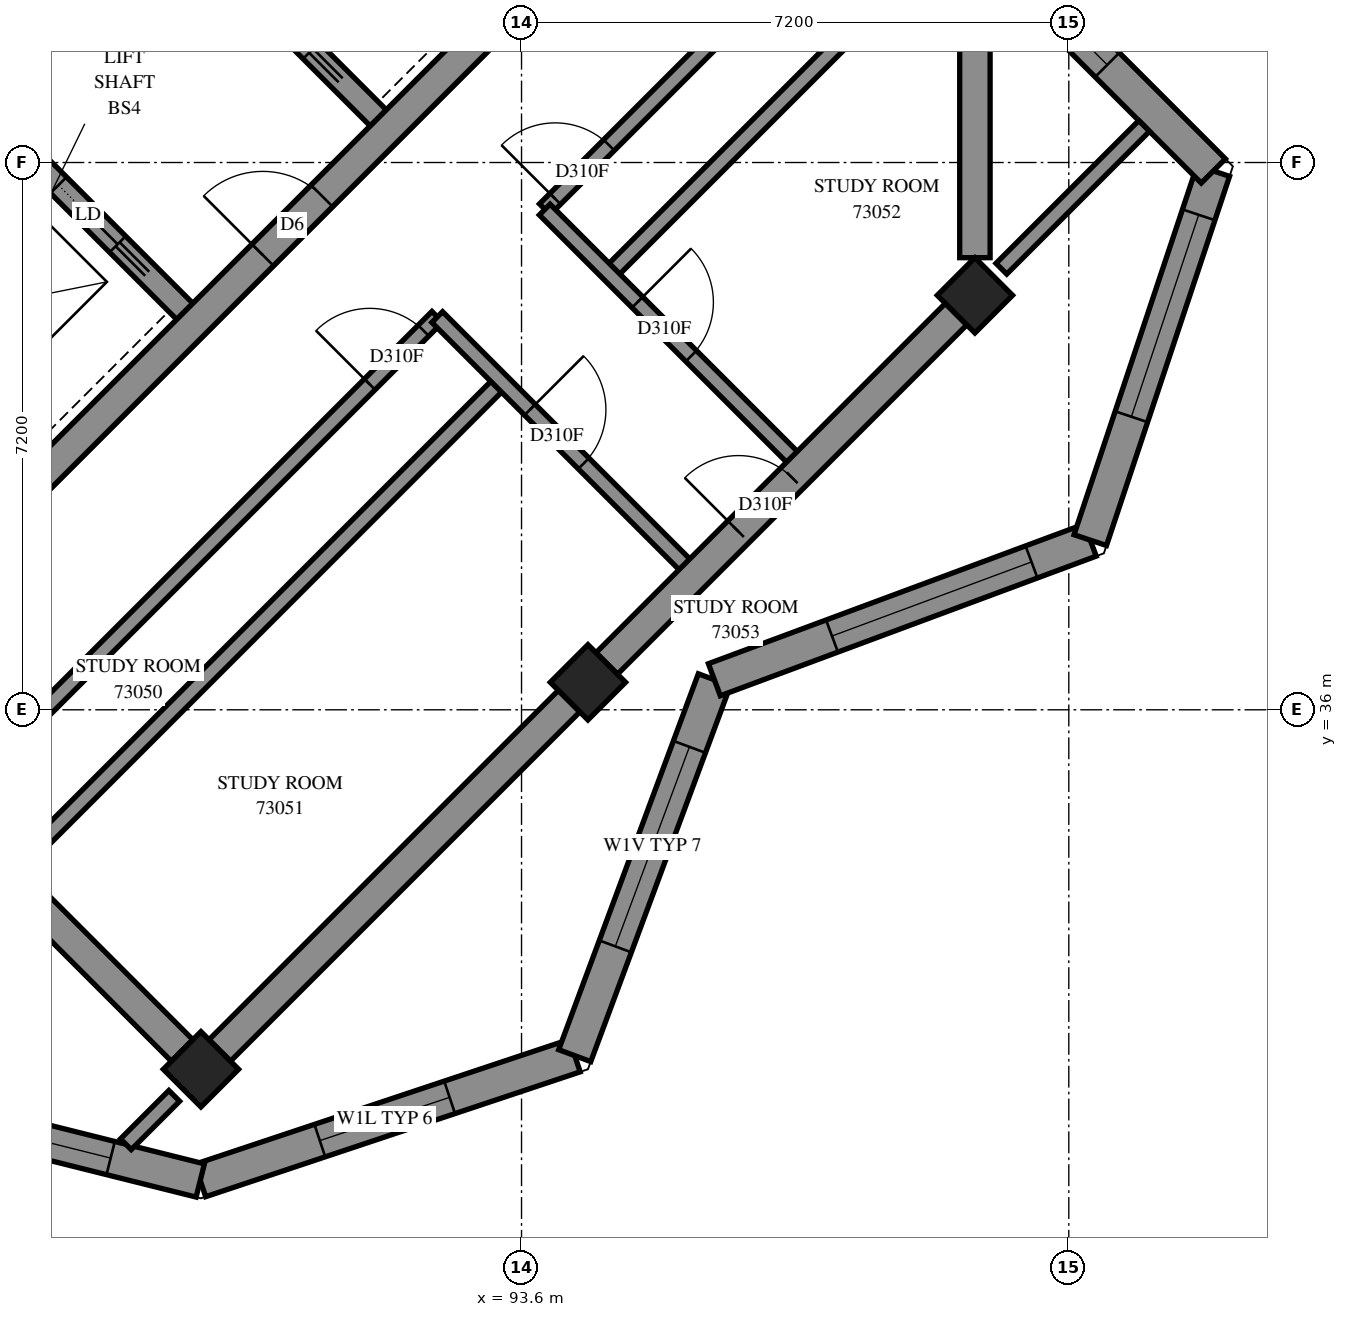
"""IFC4 building model, lengths in metres.
Left out: names, types, materials, properties, quantities, classifications, styles, units other than length and angle.
Written with IfcOpenShell. Run it as: python <this file> out.ifc"""

import sys

from ifc_helpers import new_model, si_unit, direction, frame, frame_2d, origin, origin_2d, place, context, subcontext, project, spatial, polyline, rectangle, outline, extrude, element, fill, save


model = new_model("IFC4")
c1 = context("Model", 3, precision=1e-05, world=origin(), true_north=direction((0.0, 1.0)))
c2 = subcontext(c1, "Body", "Model", "MODEL_VIEW")
j1 = project(units=[si_unit("LENGTHUNIT", "METRE"), si_unit("PLANEANGLEUNIT", "RADIAN")], contexts=[c1])
p1 = place(None, origin())
s1 = spatial("IfcSite", under=j1, at=p1, CompositionType="ELEMENT")
p2 = place(p1, origin())
s2 = spatial("IfcBuilding", under=s1, at=p2, CompositionType="ELEMENT")
p3 = place(p2, frame((0.0, 0.0, 267.6)))
s3 = spatial("IfcBuildingStorey", under=s2, at=p3, CompositionType="ELEMENT", Elevation=267.6)
for number, where, z_axis, x_axis in (
    (1, (99.565, 41.453, 0.0), (0.0, 0.0, 1.0), (0.707, -0.707, 0.0)),
    (2, (94.474, 36.362, 0.0), (0.0, 0.0, 1.0), (0.707, -0.707, 0.0)),
    (3, (89.382, 31.271, 0.0), (0.0, 0.0, 1.0), (0.707, -0.707, 0.0)),
):
    element("IfcColumn", number, at=place(p3, frame(where, z_axis=z_axis, x_axis=x_axis)), inside=s3, PredefinedType="COLUMN", context=c2, shape_type="SweptSolid", body=[
        extrude(rectangle(XDim=0.7, YDim=0.7, at=origin_2d()), origin(), (0.0, 0.0, 1.0), 3.1),
    ])
p4 = place(p3, frame((86.978, 38.766, -0.3), z_axis=(0.0, 0.0, 1.0), x_axis=(0.7071067812, 0.7071067812, 0.0)))
e4 = element("IfcWall", 4, at=p4, inside=s3, PredefinedType="SHEAR", context=c2, shape_type="SweptSolid", body=[
    extrude(rectangle(XDim=14.4, YDim=0.4, at=frame_2d((7.2, 0.0))), origin(), (0.0, 0.0, 1.0), 2.7),
])
p5 = place(p4, frame((4.55, 0.0, 0.3)))
e5 = element("IfcOpeningElement", 5, at=p5, cuts=e4, PredefinedType="OPENING", context=c2, shape_type="SweptSolid", body=[
    extrude(rectangle(XDim=1.1, YDim=2.1, at=frame_2d((0.55, 1.05))), frame((0.0, 0.21, 0.0), z_axis=(0.0, -1.0, 0.0), x_axis=(1.0, 0.0, 0.0)), (0.0, 0.0, 1.0), 0.42),
])
p6 = place(p4, frame((11.35, 0.0, 0.3)))
e6 = element("IfcOpeningElement", 6, at=p6, cuts=e4, PredefinedType="OPENING", context=c2, shape_type="SweptSolid", body=[
    extrude(rectangle(XDim=1.1, YDim=2.1, at=frame_2d((0.55, 1.05))), frame((0.0, 0.21, 0.0), z_axis=(0.0, -1.0, 0.0), x_axis=(1.0, 0.0, 0.0)), (0.0, 0.0, 1.0), 0.42),
])
p7 = place(p3, frame((78.988, 51.423, 0.0), z_axis=(0.0, 0.0, 1.0), x_axis=(0.7071067812, -0.7071067812, 0.0)))
e7 = element("IfcWall", 7, at=p7, inside=s3, PredefinedType="SOLIDWALL", context=c2, shape_type="SweptSolid", body=[
    extrude(rectangle(XDim=14.4, YDim=0.3, at=frame_2d((7.2, 0.0))), origin(), (0.0, 0.0, 1.0), 3.1),
])
p8 = place(p7, frame((4.95, 0.0, 0.0)))
e8 = element("IfcOpeningElement", 8, at=p8, cuts=e7, PredefinedType="OPENING", context=c2, shape_type="SweptSolid", body=[
    extrude(rectangle(XDim=0.9, YDim=2.1, at=frame_2d((0.45, 1.05))), frame((0.0, 0.16, 0.0), z_axis=(0.0, -1.0, 0.0), x_axis=(1.0, 0.0, 0.0)), (0.0, 0.0, 1.0), 0.32),
])
p9 = place(p7, frame((8.55, 0.0, 0.0)))
e9 = element("IfcOpeningElement", 9, at=p9, cuts=e7, PredefinedType="OPENING", context=c2, shape_type="SweptSolid", body=[
    extrude(rectangle(XDim=0.9, YDim=2.1, at=frame_2d((0.45, 1.05))), frame((0.0, 0.16, 0.0), z_axis=(0.0, -1.0, 0.0), x_axis=(1.0, 0.0, 0.0)), (0.0, 0.0, 1.0), 0.32),
])
p10 = place(p7, frame((12.05, 0.0, 0.0)))
e10 = element("IfcOpeningElement", 10, at=p10, cuts=e7, PredefinedType="OPENING", context=c2, shape_type="SweptSolid", body=[
    extrude(rectangle(XDim=1.1, YDim=2.1, at=frame_2d((0.55, 1.05))), frame((0.0, 0.16, 0.0), z_axis=(0.0, -1.0, 0.0), x_axis=(1.0, 0.0, 0.0)), (0.0, 0.0, 1.0), 0.32),
])
p11 = place(p3, frame((81.534, 53.969, 0.0), z_axis=(0.0, 0.0, 1.0), x_axis=(0.707103309, -0.7071102534, 0.0)))
e11 = element("IfcWall", 11, at=p11, inside=s3, PredefinedType="SOLIDWALL", context=c2, shape_type="SweptSolid", body=[
    extrude(rectangle(XDim=14.4, YDim=0.3, at=frame_2d((7.2, 0.0))), origin(), (0.0, 0.0, 1.0), 3.1),
])
p12 = place(p11, frame((8.55, 0.0, 0.0)))
e12 = element("IfcOpeningElement", 12, at=p12, cuts=e11, PredefinedType="OPENING", context=c2, shape_type="SweptSolid", body=[
    extrude(rectangle(XDim=0.9, YDim=2.1, at=frame_2d((0.45, 1.05))), frame((0.0, 0.16, 0.0), z_axis=(0.0, -1.0, 0.0), x_axis=(1.0, 0.0, 0.0)), (0.0, 0.0, 1.0), 0.32),
])
p13 = place(p11, frame((1.25, 0.0, 0.0)))
e13 = element("IfcOpeningElement", 13, at=p13, cuts=e11, PredefinedType="OPENING", context=c2, shape_type="SweptSolid", body=[
    extrude(rectangle(XDim=1.1, YDim=2.1, at=frame_2d((0.55, 1.05))), frame((0.0, 0.16, 0.0), z_axis=(0.0, -1.0, 0.0), x_axis=(1.0, 0.0, 0.0)), (0.0, 0.0, 1.0), 0.32),
])
p14 = place(p11, frame((4.85, 0.0, 0.0)))
e14 = element("IfcOpeningElement", 14, at=p14, cuts=e11, PredefinedType="OPENING", context=c2, shape_type="SweptSolid", body=[
    extrude(rectangle(XDim=1.1, YDim=2.1, at=frame_2d((0.55, 1.05))), frame((0.0, 0.16, 0.0), z_axis=(0.0, -1.0, 0.0), x_axis=(1.0, 0.0, 0.0)), (0.0, 0.0, 1.0), 0.32),
])
p15 = place(p11, frame((12.05, 0.0, 0.0)))
e15 = element("IfcOpeningElement", 15, at=p15, cuts=e11, PredefinedType="OPENING", context=c2, shape_type="SweptSolid", body=[
    extrude(rectangle(XDim=1.1, YDim=2.1, at=frame_2d((0.55, 1.05))), frame((0.0, 0.16, 0.0), z_axis=(0.0, -1.0, 0.0), x_axis=(1.0, 0.0, 0.0)), (0.0, 0.0, 1.0), 0.32),
])
p16 = place(p3, frame((89.373, 29.808, 0.0), z_axis=(0.0, 0.0, 1.0), x_axis=(0.9486871491, 0.3162162126, 0.0)))
e16 = element("IfcWall", 16, at=p16, inside=s3, PredefinedType="SOLIDWALL", context=c2, shape_type="SweptSolid", body=[
    extrude(outline(polyline([(-0.066, -0.225), (5.301, -0.225), (5.085, 0.225), (0.066, 0.225), (-0.066, -0.225)])), origin(), (0.0, 0.0, 1.0), 3.1),
])
p17 = place(p16, frame((1.658, 0.0, 0.6)))
e17 = element("IfcOpeningElement", 17, at=p17, cuts=e16, PredefinedType="OPENING", context=c2, shape_type="SweptSolid", body=[
    extrude(rectangle(XDim=1.8, YDim=1.9, at=frame_2d((0.9, 0.95))), frame((0.0, 0.235, 0.0), z_axis=(0.0, -1.0, 0.0), x_axis=(1.0, 0.0, 0.0)), (0.0, 0.0, 1.0), 0.47),
])
p18 = place(p3, frame((94.3, 31.45, 0.0), z_axis=(0.0, 0.0, 1.0), x_axis=(0.3481927166, 0.9374229739, 0.0)))
e18 = element("IfcWall", 18, at=p18, inside=s3, PredefinedType="SOLIDWALL", context=c2, shape_type="SweptSolid", body=[
    extrude(outline(polyline([(-0.108, -0.225), (5.172, -0.225), (5.379, 0.225), (0.108, 0.225), (-0.108, -0.225)])), origin(), (0.0, 0.0, 1.0), 3.1),
])
p19 = place(p18, frame((1.534, 0.0, 0.45)))
e19 = element("IfcOpeningElement", 19, at=p19, cuts=e18, PredefinedType="OPENING", context=c2, shape_type="SweptSolid", body=[
    extrude(rectangle(XDim=2.8, YDim=2.55, at=frame_2d((1.4, 1.275))), frame((0.0, 0.235, 0.0), z_axis=(0.0, -1.0, 0.0), x_axis=(1.0, 0.0, 0.0)), (0.0, 0.0, 1.0), 0.47),
])
p20 = place(p3, frame((96.137, 36.395, 0.0), z_axis=(0.0, 0.0, 1.0), x_axis=(0.937429161, 0.3481760591, 0.0)))
e20 = element("IfcWall", 20, at=p20, inside=s3, PredefinedType="SOLIDWALL", context=c2, shape_type="SweptSolid", body=[
    extrude(outline(polyline([(0.103, -0.225), (5.383, -0.225), (5.168, 0.225), (-0.103, 0.225), (0.103, -0.225)])), origin(), (0.0, 0.0, 1.0), 3.1),
])
p21 = place(p20, frame((1.651, 0.0, 0.45)))
e21 = element("IfcOpeningElement", 21, at=p21, cuts=e20, PredefinedType="OPENING", context=c2, shape_type="SweptSolid", body=[
    extrude(rectangle(XDim=2.8, YDim=2.55, at=frame_2d((1.4, 1.275))), frame((0.0, 0.235, 0.0), z_axis=(0.0, -1.0, 0.0), x_axis=(1.0, 0.0, 0.0)), (0.0, 0.0, 1.0), 0.47),
])
p22 = place(p3, frame((101.082, 38.232, 0.0), z_axis=(0.0, 0.0, 1.0), x_axis=(0.316227766, 0.9486832981, 0.0)))
e22 = element("IfcWall", 22, at=p22, inside=s3, PredefinedType="SOLIDWALL", context=c2, shape_type="SweptSolid", body=[
    extrude(outline(polyline([(-0.108, -0.225), (5.259, -0.225), (4.981, 0.225), (0.108, 0.225), (-0.108, -0.225)])), origin(), (0.0, 0.0, 1.0), 3.1),
])
p23 = place(p22, frame((1.711, 0.0, 0.45)))
e23 = element("IfcOpeningElement", 23, at=p23, cuts=e22, PredefinedType="OPENING", context=c2, shape_type="SweptSolid", body=[
    extrude(rectangle(XDim=2.8, YDim=2.55, at=frame_2d((1.4, 1.275))), frame((0.0, 0.235, 0.0), z_axis=(0.0, -1.0, 0.0), x_axis=(1.0, 0.0, 0.0)), (0.0, 0.0, 1.0), 0.47),
])
p24 = place(p3, frame((102.701, 43.089, 0.0), z_axis=(0.0, 0.0, 1.0), x_axis=(-0.7070965479, 0.7071170144, 0.0)))
e24 = element("IfcWall", 24, at=p24, inside=s3, PredefinedType="SOLIDWALL", context=c2, shape_type="SweptSolid", body=[
    extrude(outline(polyline([(-0.139, -0.225), (4.661, -0.225), (5.111, 0.225), (0.139, 0.225), (-0.139, -0.225)])), origin(), (0.0, 0.0, 1.0), 3.1),
])
p25 = place(p24, frame((1.974, 0.0, 0.6)))
e25 = element("IfcOpeningElement", 25, at=p25, cuts=e24, PredefinedType="OPENING", context=c2, shape_type="SweptSolid", body=[
    extrude(rectangle(XDim=1.8, YDim=1.9, at=frame_2d((0.9, 0.95))), frame((0.0, 0.235, 0.0), z_axis=(0.0, -1.0, 0.0), x_axis=(1.0, 0.0, 0.0)), (0.0, 0.0, 1.0), 0.47),
])
p26 = place(p3, frame((85.037, 30.892, 0.0), z_axis=(0.0, 0.0, 1.0), x_axis=(0.970134604, -0.2425672073, 0.0)))
e26 = element("IfcWall", 26, at=p26, inside=s3, PredefinedType="SOLIDWALL", context=c2, shape_type="SweptSolid", body=[
    extrude(outline(polyline([(-0.129, -0.225), (4.536, -0.225), (4.405, 0.225), (0.129, 0.225), (-0.129, -0.225)])), origin(), (0.0, 0.0, 1.0), 2.6),
])
p27 = place(p26, frame((1.455, 0.0, 0.6)))
e27 = element("IfcOpeningElement", 27, at=p27, cuts=e26, PredefinedType="OPENING", context=c2, shape_type="SweptSolid", body=[
    extrude(rectangle(XDim=1.8, YDim=1.9, at=frame_2d((0.9, 0.95))), frame((0.0, 0.235, 0.0), z_axis=(0.0, -1.0, 0.0), x_axis=(1.0, 0.0, 0.0)), (0.0, 0.0, 1.0), 0.47),
])
p28 = place(p3, frame((84.965, 31.946, 0.0), z_axis=(0.0, 0.0, 1.0), x_axis=(0.7070265824, 0.7071869709, 0.0)))
e28 = element("IfcWall", 28, at=p28, inside=s3, PredefinedType="PARTITIONING", context=c2, shape_type="SweptSolid", body=[
    extrude(rectangle(XDim=11.846, YDim=0.2, at=frame_2d((5.923, 0.0))), origin(), (0.0, 0.0, 1.0), 3.1),
])
p29 = place(p3, frame((93.907, 42.585, 0.0), z_axis=(0.0, 0.0, 1.0), x_axis=(0.7071067812, 0.7071067812, 0.0)))
e29 = element("IfcWall", 29, at=p29, inside=s3, PredefinedType="PARTITIONING", context=c2, shape_type="SweptSolid", body=[
    extrude(rectangle(XDim=9.201, YDim=0.2, at=frame_2d((4.601, 0.0))), origin(), (0.0, 0.0, 1.0), 3.1),
])
p30 = place(p29, frame((0.193, 0.0, 0.0)))
e30 = element("IfcOpeningElement", 30, at=p30, cuts=e29, PredefinedType="OPENING", context=c2, shape_type="SweptSolid", body=[
    extrude(rectangle(XDim=1.0, YDim=2.1, at=frame_2d((0.5, 1.05))), frame((0.0, 0.11, 0.0), z_axis=(0.0, -1.0, 0.0), x_axis=(1.0, 0.0, 0.0)), (0.0, 0.0, 1.0), 0.22),
])
p31 = place(p3, frame((86.836, 35.514, 0.0), z_axis=(0.0, 0.0, 1.0), x_axis=(0.7071067812, 0.7071067812, 0.0)))
e31 = element("IfcWall", 31, at=p31, inside=s3, PredefinedType="PARTITIONING", context=c2, shape_type="SweptSolid", body=[
    extrude(rectangle(XDim=7.999, YDim=0.2, at=frame_2d((3.999, 0.0))), origin(), (0.0, 0.0, 1.0), 3.1),
])
p32 = place(p31, frame((6.742, 0.0, 0.0)))
e32 = element("IfcOpeningElement", 32, at=p32, cuts=e31, PredefinedType="OPENING", context=c2, shape_type="SweptSolid", body=[
    extrude(rectangle(XDim=1.0, YDim=2.1, at=frame_2d((0.5, 1.05))), frame((0.0, 0.11, 0.0), z_axis=(0.0, -1.0, 0.0), x_axis=(1.0, 0.0, 0.0)), (0.0, 0.0, 1.0), 0.22),
])
p33 = place(p3, frame((94.755, 41.737, 0.0), z_axis=(0.0, 0.0, 1.0), x_axis=(0.7071146549, 0.7070989073, 0.0)))
e33 = element("IfcWall", 33, at=p33, inside=s3, PredefinedType="PARTITIONING", context=c2, shape_type="SweptSolid", body=[
    extrude(rectangle(XDim=6.35, YDim=0.2, at=frame_2d((3.175, 0.0))), origin(), (0.0, 0.0, 1.0), 3.1),
])
p34 = place(p3, frame((89.731, 31.621, 0.0), z_axis=(0.0, 0.0, 1.0), x_axis=(0.7071067812, 0.7071067812, 0.0)))
e34 = element("IfcWall", 34, at=p34, inside=s3, PredefinedType="PARTITIONING", context=c2, shape_type="SweptSolid", body=[
    extrude(rectangle(XDim=6.211, YDim=0.2, at=frame_2d((3.106, 0.0))), origin(), (0.0, 0.0, 1.0), 2.6),
])
p35 = place(p3, frame((93.905, 42.581, 0.0), z_axis=(0.0, 0.0, 1.0), x_axis=(0.7071067812, -0.7071067812, 0.0)))
e35 = element("IfcWall", 35, at=p35, inside=s3, PredefinedType="PARTITIONING", context=c2, shape_type="SweptSolid", body=[
    extrude(rectangle(XDim=4.8, YDim=0.2, at=frame_2d((2.4, 0.0))), origin(), (0.0, 0.0, 1.0), 3.1),
])
p36 = place(p35, frame((1.725, 0.0, 0.0)))
e36 = element("IfcOpeningElement", 36, at=p36, cuts=e35, PredefinedType="OPENING", context=c2, shape_type="SweptSolid", body=[
    extrude(rectangle(XDim=1.0, YDim=2.1, at=frame_2d((0.5, 1.05))), frame((0.0, 0.11, 0.0), z_axis=(0.0, -1.0, 0.0), x_axis=(1.0, 0.0, 0.0)), (0.0, 0.0, 1.0), 0.22),
])
p37 = place(p3, frame((92.491, 41.167, 0.0), z_axis=(0.0, 0.0, 1.0), x_axis=(0.7071067812, -0.7071067812, 0.0)))
e37 = element("IfcWall", 37, at=p37, inside=s3, PredefinedType="PARTITIONING", context=c2, shape_type="SweptSolid", body=[
    extrude(rectangle(XDim=4.8, YDim=0.2, at=frame_2d((2.4, 0.0))), origin(), (0.0, 0.0, 1.0), 3.1),
])
p38 = place(p37, frame((1.725, 0.0, 0.0)))
e38 = element("IfcOpeningElement", 38, at=p38, cuts=e37, PredefinedType="OPENING", context=c2, shape_type="SweptSolid", body=[
    extrude(rectangle(XDim=1.0, YDim=2.1, at=frame_2d((0.5, 1.05))), frame((0.0, 0.11, 0.0), z_axis=(0.0, -1.0, 0.0), x_axis=(1.0, 0.0, 0.0)), (0.0, 0.0, 1.0), 0.22),
])
p39 = place(p3, frame((97.301, 39.191, 0.0), z_axis=(0.0, 0.0, 1.0), x_axis=(0.7071067812, 0.7071067812, 0.0)))
e39 = element("IfcWall", 39, at=p39, inside=s3, PredefinedType="PARTITIONING", context=c2, shape_type="SweptSolid", body=[
    extrude(rectangle(XDim=2.707, YDim=0.2, at=frame_2d((1.353, 0.0))), origin(), (0.0, 0.0, 1.0), 2.6),
])
p40 = place(p3, frame((99.913, 41.803, 0.0), z_axis=(0.0, 0.0, 1.0), x_axis=(0.7071067812, 0.7071067812, 0.0)))
e40 = element("IfcWall", 40, at=p40, inside=s3, PredefinedType="PARTITIONING", context=c2, shape_type="SweptSolid", body=[
    extrude(rectangle(XDim=2.656, YDim=0.2, at=frame_2d((1.328, 0.0))), origin(), (0.0, 0.0, 1.0), 3.1),
])
p41 = place(p3, frame((95.887, 37.777, 0.0), z_axis=(0.0, 0.0, 1.0), x_axis=(0.7071067812, 0.7071067812, 0.0)))
e41 = element("IfcWall", 41, at=p41, inside=s3, PredefinedType="PARTITIONING", context=c2, shape_type="SweptSolid", body=[
    extrude(rectangle(XDim=2.0, YDim=0.2, at=frame_2d((1.0, 0.0))), origin(), (0.0, 0.0, 1.0), 2.6),
])
p42 = place(p41, frame((0.803, 0.0, 0.0)))
e42 = element("IfcOpeningElement", 42, at=p42, cuts=e41, PredefinedType="OPENING", context=c2, shape_type="SweptSolid", body=[
    extrude(rectangle(XDim=1.0, YDim=2.1, at=frame_2d((0.5, 1.05))), frame((0.0, 0.11, 0.0), z_axis=(0.0, -1.0, 0.0), x_axis=(1.0, 0.0, 0.0)), (0.0, 0.0, 1.0), 0.22),
])
p43 = place(p3, frame((94.823, 36.713, 0.0), z_axis=(0.0, 0.0, 1.0), x_axis=(0.7071067812, 0.7071067812, 0.0)))
e43 = element("IfcWall", 43, at=p43, inside=s3, PredefinedType="PARTITIONING", context=c2, shape_type="SweptSolid", body=[
    extrude(rectangle(XDim=1.505, YDim=0.2, at=frame_2d((0.752, 0.0))), origin(), (0.0, 0.0, 1.0), 2.6),
])
p44 = place(p3, frame((88.394, 30.284, 0.0), z_axis=(0.0, 0.0, 1.0), x_axis=(0.7070512369, 0.7071623211, 0.0)))
e44 = element("IfcWall", 44, at=p44, inside=s3, PredefinedType="PARTITIONING", context=c2, shape_type="SweptSolid", body=[
    extrude(rectangle(XDim=0.9, YDim=0.2, at=frame_2d((0.45, 0.0))), origin(), (0.0, 0.0, 1.0), 2.6),
])
p45 = place(p17, origin())
e45 = element("IfcWindow", 45, at=p45, inside=s3, PartitioningType="SINGLE_PANEL", PredefinedType="WINDOW", context=c2, shape_type="SweptSolid", body=[
    extrude(rectangle(XDim=1.8, YDim=1.9, at=frame_2d((0.9, 0.95))), frame((0.0, 0.205, 0.0), z_axis=(0.0, -1.0, 0.0), x_axis=(1.0, 0.0, 0.0)), (0.0, 0.0, 1.0), 0.06),
])
fill(e17, e45)
p46 = place(p19, origin())
e46 = element("IfcWindow", 46, at=p46, inside=s3, PartitioningType="SINGLE_PANEL", PredefinedType="WINDOW", context=c2, shape_type="SweptSolid", body=[
    extrude(rectangle(XDim=2.8, YDim=2.55, at=frame_2d((1.4, 1.275))), frame((0.0, 0.205, 0.0), z_axis=(0.0, -1.0, 0.0), x_axis=(1.0, 0.0, 0.0)), (0.0, 0.0, 1.0), 0.06),
])
fill(e19, e46)
p47 = place(p21, origin())
e47 = element("IfcWindow", 47, at=p47, inside=s3, PartitioningType="SINGLE_PANEL", PredefinedType="WINDOW", context=c2, shape_type="SweptSolid", body=[
    extrude(rectangle(XDim=2.8, YDim=2.55, at=frame_2d((1.4, 1.275))), frame((0.0, 0.205, 0.0), z_axis=(0.0, -1.0, 0.0), x_axis=(1.0, 0.0, 0.0)), (0.0, 0.0, 1.0), 0.06),
])
fill(e21, e47)
p48 = place(p23, origin())
e48 = element("IfcWindow", 48, at=p48, inside=s3, PartitioningType="SINGLE_PANEL", PredefinedType="WINDOW", context=c2, shape_type="SweptSolid", body=[
    extrude(rectangle(XDim=2.8, YDim=2.55, at=frame_2d((1.4, 1.275))), frame((0.0, 0.205, 0.0), z_axis=(0.0, -1.0, 0.0), x_axis=(1.0, 0.0, 0.0)), (0.0, 0.0, 1.0), 0.06),
])
fill(e23, e48)
p49 = place(p25, origin())
e49 = element("IfcWindow", 49, at=p49, inside=s3, PartitioningType="SINGLE_PANEL", PredefinedType="WINDOW", context=c2, shape_type="SweptSolid", body=[
    extrude(rectangle(XDim=1.8, YDim=1.9, at=frame_2d((0.9, 0.95))), frame((0.0, 0.205, 0.0), z_axis=(0.0, -1.0, 0.0), x_axis=(1.0, 0.0, 0.0)), (0.0, 0.0, 1.0), 0.06),
])
fill(e25, e49)
p50 = place(p27, origin())
e50 = element("IfcWindow", 50, at=p50, inside=s3, PartitioningType="SINGLE_PANEL", PredefinedType="WINDOW", context=c2, shape_type="SweptSolid", body=[
    extrude(rectangle(XDim=1.8, YDim=1.9, at=frame_2d((0.9, 0.95))), frame((0.0, 0.205, 0.0), z_axis=(0.0, -1.0, 0.0), x_axis=(1.0, 0.0, 0.0)), (0.0, 0.0, 1.0), 0.06),
])
fill(e27, e50)
p51 = place(p5, origin())
e51 = element("IfcDoor", 51, at=p51, inside=s3, OperationType="DOUBLE_DOOR_SINGLE_SWING", PredefinedType="DOOR", context=c2, shape_type="SweptSolid", body=[
    extrude(rectangle(XDim=1.1, YDim=2.1, at=frame_2d((0.55, 1.05))), frame((0.0, 0.025, 0.0), z_axis=(0.0, -1.0, 0.0), x_axis=(1.0, 0.0, 0.0)), (0.0, 0.0, 1.0), 0.05),
])
fill(e5, e51)
p52 = place(p10, origin())
e52 = element("IfcDoor", 52, at=p52, inside=s3, OperationType="SLIDING_TO_RIGHT", PredefinedType="DOOR", context=c2, shape_type="SweptSolid", body=[
    extrude(rectangle(XDim=1.1, YDim=2.1, at=frame_2d((0.55, 1.05))), frame((0.0, 0.025, 0.0), z_axis=(0.0, -1.0, 0.0), x_axis=(1.0, 0.0, 0.0)), (0.0, 0.0, 1.0), 0.05),
])
fill(e10, e52)
p53 = place(p30, origin())
e53 = element("IfcDoor", 53, at=p53, inside=s3, OperationType="SINGLE_SWING_LEFT", PredefinedType="DOOR", context=c2, shape_type="SweptSolid", body=[
    extrude(rectangle(XDim=1.0, YDim=2.1, at=frame_2d((0.5, 1.05))), frame((0.0, 0.025, 0.0), z_axis=(0.0, -1.0, 0.0), x_axis=(1.0, 0.0, 0.0)), (0.0, 0.0, 1.0), 0.05),
])
fill(e30, e53)
p54 = place(p32, origin())
e54 = element("IfcDoor", 54, at=p54, inside=s3, OperationType="SINGLE_SWING_RIGHT", PredefinedType="DOOR", context=c2, shape_type="SweptSolid", body=[
    extrude(rectangle(XDim=1.0, YDim=2.1, at=frame_2d((0.5, 1.05))), frame((0.0, 0.025, 0.0), z_axis=(0.0, -1.0, 0.0), x_axis=(1.0, 0.0, 0.0)), (0.0, 0.0, 1.0), 0.05),
])
fill(e32, e54)
p55 = place(p38, origin())
e55 = element("IfcDoor", 55, at=p55, inside=s3, OperationType="SINGLE_SWING_LEFT", PredefinedType="DOOR", context=c2, shape_type="SweptSolid", body=[
    extrude(rectangle(XDim=1.0, YDim=2.1, at=frame_2d((0.5, 1.05))), frame((0.0, 0.025, 0.0), z_axis=(0.0, -1.0, 0.0), x_axis=(1.0, 0.0, 0.0)), (0.0, 0.0, 1.0), 0.05),
])
fill(e38, e55)
p56 = place(p36, origin())
e56 = element("IfcDoor", 56, at=p56, inside=s3, OperationType="SINGLE_SWING_RIGHT", PredefinedType="DOOR", context=c2, shape_type="SweptSolid", body=[
    extrude(rectangle(XDim=1.0, YDim=2.1, at=frame_2d((0.5, 1.05))), frame((0.0, 0.025, 0.0), z_axis=(0.0, -1.0, 0.0), x_axis=(1.0, 0.0, 0.0)), (0.0, 0.0, 1.0), 0.05),
])
fill(e36, e56)
p57 = place(p42, origin())
e57 = element("IfcDoor", 57, at=p57, inside=s3, OperationType="SINGLE_SWING_RIGHT", PredefinedType="DOOR", context=c2, shape_type="SweptSolid", body=[
    extrude(rectangle(XDim=1.0, YDim=2.1, at=frame_2d((0.5, 1.05))), frame((0.0, 0.025, 0.0), z_axis=(0.0, -1.0, 0.0), x_axis=(1.0, 0.0, 0.0)), (0.0, 0.0, 1.0), 0.05),
])
fill(e42, e57)
save(model, sys.argv[1])
